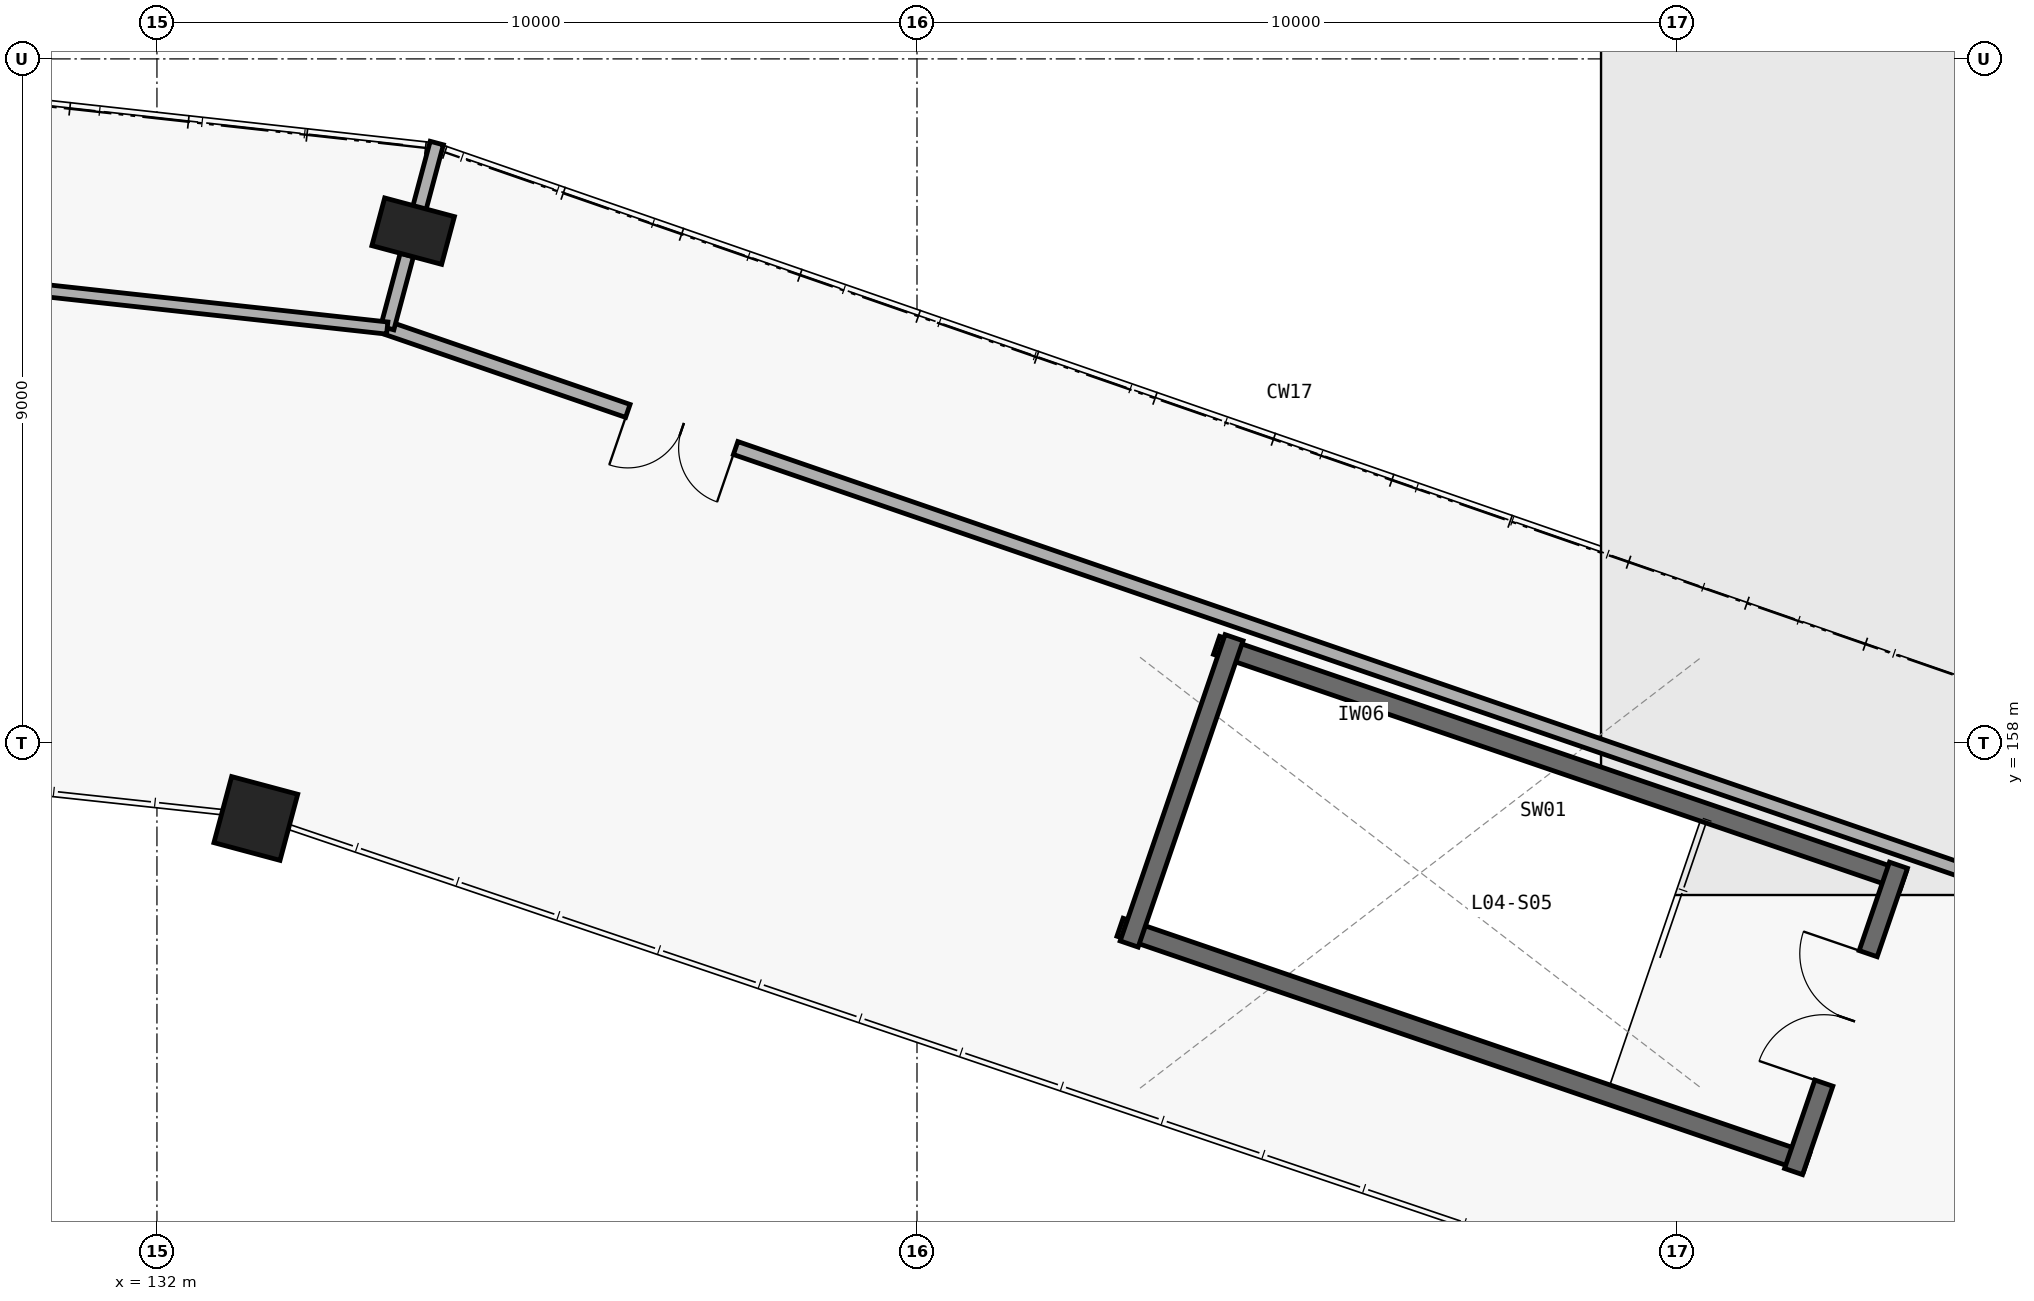
"""IFC4 building model, lengths in metres.
Left out: names, types, materials, properties, quantities, classifications, styles, units other than length and angle.
Written with IfcOpenShell. Run it as: python <this file> out.ifc"""

import sys

from ifc_helpers import new_model, si_unit, direction, frame, frame_2d, origin, origin_2d, place, context, subcontext, project, spatial, rectangle, extrude, element, fill, save


model = new_model("IFC4")
c1 = context("Model", 3, precision=1e-05, world=origin(), true_north=direction((0.0, 1.0)))
c2 = subcontext(c1, "Body", "Model", "MODEL_VIEW")
j1 = project(units=[si_unit("LENGTHUNIT", "METRE"), si_unit("PLANEANGLEUNIT", "RADIAN")], contexts=[c1])
p1 = place(None, origin())
s1 = spatial("IfcSite", under=j1, at=p1, CompositionType="ELEMENT")
p2 = place(p1, origin())
s2 = spatial("IfcBuilding", under=s1, at=p2, CompositionType="ELEMENT")
p3 = place(p2, frame((0.0, 0.0, 19.8)))
s3 = spatial("IfcBuildingStorey", under=s2, at=p3, CompositionType="ELEMENT", Elevation=19.8)
p4 = place(p3, frame((135.371, 164.734, 0.0), z_axis=(0.0, 0.0, 1.0), x_axis=(0.258819045103, 0.965925826289, 0.0)))
e1 = element("IfcColumn", 1, at=p4, inside=s3, PredefinedType="COLUMN", context=c2, shape_type="SweptSolid", body=[
    extrude(rectangle(XDim=0.65, YDim=0.95, at=origin_2d()), origin(), (0.0, 0.0, 1.0), 4.8),
])
p5 = place(p3, frame((133.301, 157.007, 0.0), z_axis=(0.0, 0.0, 1.0), x_axis=(0.258819045103, 0.965925826289, 0.0)))
e2 = element("IfcColumn", 2, at=p5, inside=s3, PredefinedType="COLUMN", context=c2, shape_type="SweptSolid", body=[
    extrude(rectangle(XDim=0.9, YDim=0.9, at=origin_2d()), origin(), (0.0, 0.0, 1.0), 4.8),
])
for number, where, z_axis, x_axis in (
    (3, (154.976, 156.191, 0.0), (0.0, 0.0, 1.0), (-0.946, 0.324, 0.0)),
    (4, (144.672, 155.576, 0.0), (0.0, 0.0, 1.0), (0.946, -0.324, 0.0)),
):
    element("IfcWall", number, at=place(p3, frame(where, z_axis=z_axis, x_axis=x_axis)), inside=s3, PredefinedType="SHEAR", context=c2, shape_type="SweptSolid", body=[
        extrude(rectangle(XDim=9.55, YDim=0.25, at=frame_2d((4.775, 0.0))), origin(), (0.0, 0.0, 1.0), 4.54),
    ])
p6 = place(p3, frame((153.533, 152.362, 0.0), z_axis=(0.0, 0.0, 1.0), x_axis=(0.323971192516, 0.946066946056, 0.0)))
e5 = element("IfcWall", 5, at=p6, inside=s3, PredefinedType="SHEAR", context=c2, shape_type="SweptSolid", body=[
    extrude(rectangle(XDim=4.26, YDim=0.25, at=frame_2d((2.13, 0.0))), origin(), (0.0, 0.0, 1.0), 4.54),
])
p7 = place(p6, frame((1.23, 0.0, 0.0)))
e6 = element("IfcOpeningElement", 6, at=p7, cuts=e5, PredefinedType="OPENING", context=c2, shape_type="SweptSolid", body=[
    extrude(rectangle(XDim=1.8, YDim=2.25, at=frame_2d((0.9, 1.125))), frame((0.0, 0.135, 0.0), z_axis=(0.0, -1.0, 0.0), x_axis=(1.0, 0.0, 0.0)), (0.0, 0.0, 1.0), 0.27),
])
p8 = place(p3, frame((146.172, 159.385, 0.0), z_axis=(0.0, 0.0, 1.0), x_axis=(-0.323971192516, -0.946066946056, 0.0)))
e7 = element("IfcWall", 7, at=p8, inside=s3, PredefinedType="SHEAR", context=c2, shape_type="SweptSolid", body=[
    extrude(rectangle(XDim=4.26, YDim=0.25, at=frame_2d((2.13, 0.0))), origin(), (0.0, 0.0, 1.0), 4.54),
])
p9 = place(p3, frame((156.49, 156.069, 0.0), z_axis=(0.0, 0.0, 1.0), x_axis=(-0.945509956828, 0.32559318411, 0.0)))
e8 = element("IfcWall", 8, at=p9, inside=s3, PredefinedType="PARTITIONING", context=c2, shape_type="SweptSolid", body=[
    extrude(rectangle(XDim=22.697, YDim=0.18, at=frame_2d((11.348, 0.0))), origin(), (0.0, 0.0, 1.0), 3.665),
])
p10 = place(p9, frame((17.849, 0.0, 0.0)))
e9 = element("IfcOpeningElement", 9, at=p10, cuts=e8, PredefinedType="OPENING", context=c2, shape_type="SweptSolid", body=[
    extrude(rectangle(XDim=1.5, YDim=2.15, at=frame_2d((0.75, 1.075))), frame((0.0, 0.1, 0.0), z_axis=(0.0, -1.0, 0.0), x_axis=(1.0, 0.0, 0.0)), (0.0, 0.0, 1.0), 0.2),
])
p11 = place(p3, frame((135.03, 163.459, 0.0), z_axis=(0.0, 0.0, 1.0), x_axis=(0.258550707932, 0.965997687072, 0.0)))
e10 = element("IfcWall", 10, at=p11, inside=s3, PredefinedType="PARTITIONING", context=c2, shape_type="SweptSolid", body=[
    extrude(rectangle(XDim=1.01, YDim=0.18, at=frame_2d((0.505, 0.0))), origin(), (0.0, 0.0, 1.0), 3.665),
])
p12 = place(p3, frame((135.288, 164.419, 0.0), z_axis=(0.0, 0.0, 1.0), x_axis=(0.25809085904, 0.966120649029, 0.0)))
e11 = element("IfcWall", 11, at=p12, inside=s3, PredefinedType="PARTITIONING", context=c2, shape_type="SweptSolid", body=[
    extrude(rectangle(XDim=1.526, YDim=0.18, at=frame_2d((0.763, 0.0))), origin(), (0.0, 0.0, 1.0), 3.665),
])
p13 = place(p3, frame((135.03, 163.459, 0.0), z_axis=(0.0, 0.0, 1.0), x_axis=(-0.994061953131, 0.108815593262, 0.0)))
e12 = element("IfcWall", 12, at=p13, inside=s3, PredefinedType="PARTITIONING", context=c2, shape_type="SweptSolid", body=[
    extrude(rectangle(XDim=23.167, YDim=0.16, at=frame_2d((11.584, 0.0))), origin(), (0.0, 0.0, 1.0), 3.665),
])
p14 = place(p13, frame((10.734, 0.0, 0.0)))
e13 = element("IfcOpeningElement", 13, at=p14, cuts=e12, PredefinedType="OPENING", context=c2, shape_type="SweptSolid", body=[
    extrude(rectangle(XDim=1.7, YDim=2.2, at=frame_2d((0.85, 1.1))), frame((0.0, 0.09, 0.0), z_axis=(0.0, -1.0, 0.0), x_axis=(1.0, 0.0, 0.0)), (0.0, 0.0, 1.0), 0.18),
])
p15 = place(p7, origin())
e14 = element("IfcDoor", 14, at=p15, inside=s3, OperationType="DOUBLE_DOOR_SINGLE_SWING", PredefinedType="DOOR", context=c2, shape_type="SweptSolid", body=[
    extrude(rectangle(XDim=1.8, YDim=2.25, at=frame_2d((0.9, 1.125))), frame((0.0, 0.025, 0.0), z_axis=(0.0, -1.0, 0.0), x_axis=(1.0, 0.0, 0.0)), (0.0, 0.0, 1.0), 0.05),
])
fill(e6, e14)
p16 = place(p10, origin())
e15 = element("IfcDoor", 15, at=p16, inside=s3, OperationType="DOUBLE_DOOR_SINGLE_SWING", PredefinedType="DOOR", context=c2, shape_type="SweptSolid", body=[
    extrude(rectangle(XDim=1.5, YDim=2.15, at=frame_2d((0.75, 1.075))), frame((0.0, 0.025, 0.0), z_axis=(0.0, -1.0, 0.0), x_axis=(1.0, 0.0, 0.0)), (0.0, 0.0, 1.0), 0.05),
])
fill(e9, e15)
save(model, sys.argv[1])
